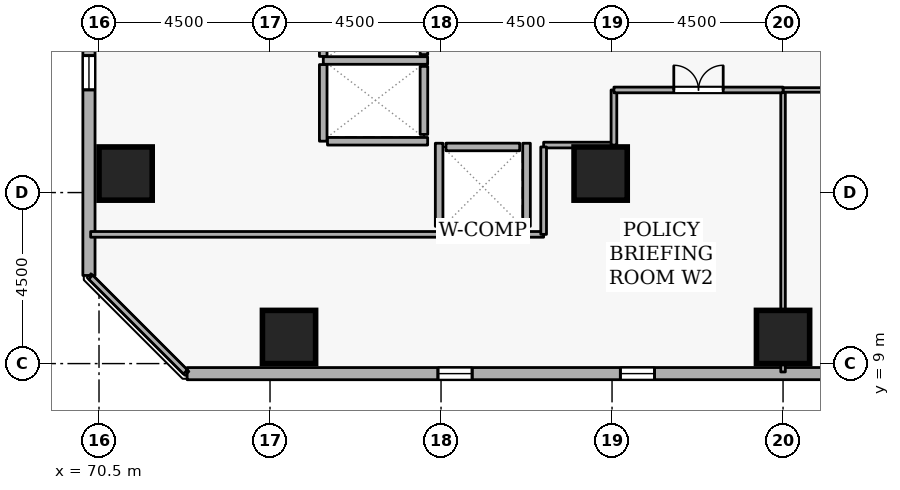
"""IFC4 building model, lengths in metres.
Left out: names, types, materials, properties, quantities, classifications, styles, units other than length and angle.
Written with IfcOpenShell. Run it as: python <this file> out.ifc"""

import sys

from ifc_helpers import new_model, si_unit, direction, frame, frame_2d, origin, origin_2d, place, context, subcontext, project, spatial, rectangle, extrude, element, fill, save


model = new_model("IFC4")
c1 = context("Model", 3, precision=1e-05, world=origin(), true_north=direction((0.0, 1.0)))
c2 = subcontext(c1, "Body", "Model", "MODEL_VIEW")
j1 = project(units=[si_unit("LENGTHUNIT", "METRE"), si_unit("PLANEANGLEUNIT", "RADIAN")], contexts=[c1])
p1 = place(None, origin())
s1 = spatial("IfcSite", under=j1, at=p1, CompositionType="ELEMENT")
p2 = place(p1, origin())
s2 = spatial("IfcBuilding", under=s1, at=p2, CompositionType="ELEMENT")
p3 = place(p2, frame((0.0, 0.0, 57.3)))
s3 = spatial("IfcBuildingStorey", under=s2, at=p3, CompositionType="ELEMENT", Elevation=57.3)
for number, where, z_axis, x_axis in (
    (1, (71.2, 14.0, 0.0), (0.0, 0.0, 1.0), (1.0, 0.0, 0.0)),
    (2, (88.5, 9.7, 0.0), (0.0, 0.0, 1.0), (1.0, 0.0, 0.0)),
    (3, (75.5, 9.7, 0.0), (0.0, 0.0, 1.0), (1.0, 0.0, 0.0)),
    (4, (83.7, 14.0, 0.0), (0.0, 0.0, 1.0), (1.0, 0.0, 0.0)),
):
    element("IfcColumn", number, at=place(p3, frame(where, z_axis=z_axis, x_axis=x_axis)), inside=s3, PredefinedType="COLUMN", context=c2, shape_type="SweptSolid", body=[
        extrude(rectangle(XDim=1.4, YDim=1.4, at=origin_2d()), origin(), (0.0, 0.0, 1.0), 3.6),
    ])
p4 = place(p3, frame((72.819, 8.735, 0.0), z_axis=(0.0, 0.0, 1.0), x_axis=(0.999999996195, 8.7231344e-05, 0.0)))
e5 = element("IfcWall", 5, at=p4, inside=s3, PredefinedType="STANDARD", context=c2, shape_type="SweptSolid", body=[
    extrude(rectangle(XDim=36.384, YDim=0.32, at=frame_2d((18.192, 0.0))), origin(), (0.0, 0.0, 1.0), 2.7),
])
p5 = place(p4, frame((6.6, 0.0, 0.72)))
e6 = element("IfcOpeningElement", 6, at=p5, cuts=e5, PredefinedType="OPENING", context=c2, shape_type="SweptSolid", body=[
    extrude(rectangle(XDim=0.9, YDim=1.75, at=frame_2d((0.45, 0.875))), frame((0.0, 0.17, 0.0), z_axis=(0.0, -1.0, 0.0), x_axis=(1.0, 0.0, 0.0)), (0.0, 0.0, 1.0), 0.34),
])
p6 = place(p4, frame((11.4, 0.0, 0.72)))
e7 = element("IfcOpeningElement", 7, at=p6, cuts=e5, PredefinedType="OPENING", context=c2, shape_type="SweptSolid", body=[
    extrude(rectangle(XDim=0.9, YDim=1.75, at=frame_2d((0.45, 0.875))), frame((0.0, 0.17, 0.0), z_axis=(0.0, -1.0, 0.0), x_axis=(1.0, 0.0, 0.0)), (0.0, 0.0, 1.0), 0.34),
])
p7 = place(p4, frame((21.0, 0.0, 0.72)))
e8 = element("IfcOpeningElement", 8, at=p7, cuts=e5, PredefinedType="OPENING", context=c2, shape_type="SweptSolid", body=[
    extrude(rectangle(XDim=0.9, YDim=1.75, at=frame_2d((0.45, 0.875))), frame((0.0, 0.17, 0.0), z_axis=(0.0, -1.0, 0.0), x_axis=(1.0, 0.0, 0.0)), (0.0, 0.0, 1.0), 0.34),
])
p8 = place(p4, frame((25.8, 0.0, 0.72)))
e9 = element("IfcOpeningElement", 9, at=p8, cuts=e5, PredefinedType="OPENING", context=c2, shape_type="SweptSolid", body=[
    extrude(rectangle(XDim=0.9, YDim=1.75, at=frame_2d((0.45, 0.875))), frame((0.0, 0.17, 0.0), z_axis=(0.0, -1.0, 0.0), x_axis=(1.0, 0.0, 0.0)), (0.0, 0.0, 1.0), 0.34),
])
p9 = place(p3, frame((70.238, 47.703, 0.0), z_axis=(0.0, 0.0, 1.0), x_axis=(-8.7231344e-05, -0.999999996195, 0.0)))
e10 = element("IfcWall", 10, at=p9, inside=s3, PredefinedType="STANDARD", context=c2, shape_type="SweptSolid", body=[
    extrude(rectangle(XDim=36.384, YDim=0.32, at=frame_2d((18.192, 0.0))), origin(), (0.0, 0.0, 1.0), 2.7),
])
p10 = place(p9, frame((1.8, 0.0, 0.72)))
e11 = element("IfcOpeningElement", 11, at=p10, cuts=e10, PredefinedType="OPENING", context=c2, shape_type="SweptSolid", body=[
    extrude(rectangle(XDim=0.9, YDim=1.75, at=frame_2d((0.45, 0.875))), frame((0.0, 0.17, 0.0), z_axis=(0.0, -1.0, 0.0), x_axis=(1.0, 0.0, 0.0)), (0.0, 0.0, 1.0), 0.34),
])
p11 = place(p9, frame((11.4, 0.0, 0.72)))
e12 = element("IfcOpeningElement", 12, at=p11, cuts=e10, PredefinedType="OPENING", context=c2, shape_type="SweptSolid", body=[
    extrude(rectangle(XDim=0.9, YDim=1.75, at=frame_2d((0.45, 0.875))), frame((0.0, 0.17, 0.0), z_axis=(0.0, -1.0, 0.0), x_axis=(1.0, 0.0, 0.0)), (0.0, 0.0, 1.0), 0.34),
])
p12 = place(p9, frame((16.2, 0.0, 0.72)))
e13 = element("IfcOpeningElement", 13, at=p12, cuts=e10, PredefinedType="OPENING", context=c2, shape_type="SweptSolid", body=[
    extrude(rectangle(XDim=0.9, YDim=1.75, at=frame_2d((0.45, 0.875))), frame((0.0, 0.17, 0.0), z_axis=(0.0, -1.0, 0.0), x_axis=(1.0, 0.0, 0.0)), (0.0, 0.0, 1.0), 0.34),
])
p13 = place(p9, frame((25.8, 0.0, 0.72)))
e14 = element("IfcOpeningElement", 14, at=p13, cuts=e10, PredefinedType="OPENING", context=c2, shape_type="SweptSolid", body=[
    extrude(rectangle(XDim=0.9, YDim=1.75, at=frame_2d((0.45, 0.875))), frame((0.0, 0.17, 0.0), z_axis=(0.0, -1.0, 0.0), x_axis=(1.0, 0.0, 0.0)), (0.0, 0.0, 1.0), 0.34),
])
p14 = place(p9, frame((30.6, 0.0, 0.72)))
e15 = element("IfcOpeningElement", 15, at=p14, cuts=e10, PredefinedType="OPENING", context=c2, shape_type="SweptSolid", body=[
    extrude(rectangle(XDim=0.9, YDim=1.75, at=frame_2d((0.45, 0.875))), frame((0.0, 0.17, 0.0), z_axis=(0.0, -1.0, 0.0), x_axis=(1.0, 0.0, 0.0)), (0.0, 0.0, 1.0), 0.34),
])
p15 = place(p3, frame((79.05, 17.13, 0.0), z_axis=(0.0, 0.0, 1.0), x_axis=(0.0, 1.0, 0.0)))
e16 = element("IfcWall", 16, at=p15, inside=s3, PredefinedType="STANDARD", context=c2, shape_type="SweptSolid", body=[
    extrude(rectangle(XDim=1.74, YDim=0.2, at=frame_2d((0.87, 0.0))), origin(), (0.0, 0.0, 1.0), 3.34),
])
p16 = place(p3, frame((79.05, 15.03, 0.0), z_axis=(0.0, 0.0, 1.0), x_axis=(0.0, 1.0, 0.0)))
e17 = element("IfcWall", 17, at=p16, inside=s3, PredefinedType="STANDARD", context=c2, shape_type="SweptSolid", body=[
    extrude(rectangle(XDim=1.79, YDim=0.2, at=frame_2d((0.895, 0.0))), origin(), (0.0, 0.0, 1.0), 3.34),
])
p17 = place(p3, frame((79.63, 14.7, 0.0), z_axis=(0.0, 0.0, 1.0), x_axis=(1.0, 0.0, 0.0)))
e18 = element("IfcWall", 18, at=p17, inside=s3, PredefinedType="STANDARD", context=c2, shape_type="SweptSolid", body=[
    extrude(rectangle(XDim=1.94, YDim=0.2, at=frame_2d((0.97, 0.0))), origin(), (0.0, 0.0, 1.0), 3.34),
])
p18 = place(p3, frame((76.402, 16.975, 0.0), z_axis=(0.0, 0.0, 1.0), x_axis=(1.0, 0.0, 0.0)))
e19 = element("IfcWall", 19, at=p18, inside=s3, PredefinedType="STANDARD", context=c2, shape_type="SweptSolid", body=[
    extrude(rectangle(XDim=2.746, YDim=0.2, at=frame_2d((1.373, 0.0))), origin(), (0.0, 0.0, 1.0), 3.34),
])
p19 = place(p3, frame((76.4, 14.852, 0.0), z_axis=(0.0, 0.0, 1.0), x_axis=(0.0, 1.0, 0.0)))
e20 = element("IfcWall", 20, at=p19, inside=s3, PredefinedType="STANDARD", context=c2, shape_type="SweptSolid", body=[
    extrude(rectangle(XDim=2.016, YDim=0.2, at=frame_2d((1.008, 0.0))), origin(), (0.0, 0.0, 1.0), 3.34),
])
p20 = place(p3, frame((76.4, 17.082, 0.0), z_axis=(0.0, 0.0, 1.0), x_axis=(0.0, 1.0, 0.0)))
e21 = element("IfcWall", 21, at=p20, inside=s3, PredefinedType="STANDARD", context=c2, shape_type="SweptSolid", body=[
    extrude(rectangle(XDim=1.856, YDim=0.2, at=frame_2d((0.928, 0.0))), origin(), (0.0, 0.0, 1.0), 3.34),
])
p21 = place(p3, frame((76.512, 14.85, 0.0), z_axis=(0.0, 0.0, 1.0), x_axis=(1.0, 0.0, 0.0)))
e22 = element("IfcWall", 22, at=p21, inside=s3, PredefinedType="STANDARD", context=c2, shape_type="SweptSolid", body=[
    extrude(rectangle(XDim=2.636, YDim=0.2, at=frame_2d((1.318, 0.0))), origin(), (0.0, 0.0, 1.0), 3.34),
])
p22 = place(p3, frame((79.452, 12.5, 0.0), z_axis=(0.0, 0.0, 1.0), x_axis=(1.0, 0.0, 0.0)))
e23 = element("IfcWall", 23, at=p22, inside=s3, PredefinedType="STANDARD", context=c2, shape_type="SweptSolid", body=[
    extrude(rectangle(XDim=2.296, YDim=0.2, at=frame_2d((1.148, 0.0))), origin(), (0.0, 0.0, 1.0), 3.34),
])
for number, where, z_axis, x_axis in (
    (24, (81.75, 12.612, 0.0), (0.0, 0.0, 1.0), (0.0, 1.0, 0.0)),
    (25, (79.45, 12.612, 0.0), (0.0, 0.0, 1.0), (0.0, 1.0, 0.0)),
):
    element("IfcWall", number, at=place(p3, frame(where, z_axis=z_axis, x_axis=x_axis)), inside=s3, PredefinedType="STANDARD", context=c2, shape_type="SweptSolid", body=[
        extrude(rectangle(XDim=2.186, YDim=0.2, at=frame_2d((1.093, 0.0))), origin(), (0.0, 0.0, 1.0), 3.34),
    ])
p23 = place(p3, frame((88.5, 8.78, 0.0), z_axis=(0.0, 0.0, 1.0), x_axis=(0.0, 1.0, 0.0)))
e26 = element("IfcWall", 26, at=p23, inside=s3, PredefinedType="PARTITIONING", context=c2, shape_type="SweptSolid", body=[
    extrude(rectangle(XDim=7.42, YDim=0.12, at=frame_2d((3.71, 0.0))), origin(), (0.0, 0.0, 1.0), 2.932),
])
p24 = place(p3, frame((88.5, 16.2, 0.0), z_axis=(0.0, 0.0, 1.0), x_axis=(1.0, 0.0, 0.0)))
e27 = element("IfcWall", 27, at=p24, inside=s3, PredefinedType="PARTITIONING", context=c2, shape_type="SweptSolid", body=[
    extrude(rectangle(XDim=4.45, YDim=0.12, at=frame_2d((2.225, 0.0))), origin(), (0.0, 0.0, 1.0), 3.34),
])
p25 = place(p3, frame((82.2, 14.75, 0.0), z_axis=(0.0, 0.0, 1.0), x_axis=(1.0, 0.0, 0.0)))
e28 = element("IfcWall", 28, at=p25, inside=s3, PredefinedType="PARTITIONING", context=c2, shape_type="SweptSolid", body=[
    extrude(rectangle(XDim=1.85, YDim=0.15, at=frame_2d((0.925, 0.0))), origin(), (0.0, 0.0, 1.0), 3.34),
])
p26 = place(p3, frame((84.05, 14.75, 0.0), z_axis=(0.0, 0.0, 1.0), x_axis=(0.0, 1.0, 0.0)))
e29 = element("IfcWall", 29, at=p26, inside=s3, PredefinedType="PARTITIONING", context=c2, shape_type="SweptSolid", body=[
    extrude(rectangle(XDim=1.45, YDim=0.15, at=frame_2d((0.725, 0.0))), origin(), (0.0, 0.0, 1.0), 3.34),
])
p27 = place(p3, frame((84.05, 16.2, 0.0), z_axis=(0.0, 0.0, 1.0), x_axis=(1.0, 0.0, 0.0)))
e30 = element("IfcWall", 30, at=p27, inside=s3, PredefinedType="PARTITIONING", context=c2, shape_type="SweptSolid", body=[
    extrude(rectangle(XDim=4.45, YDim=0.15, at=frame_2d((2.225, 0.0))), origin(), (0.0, 0.0, 1.0), 3.34),
])
p28 = place(p27, frame((1.575, 0.0, 0.0)))
e31 = element("IfcOpeningElement", 31, at=p28, cuts=e30, PredefinedType="OPENING", context=c2, shape_type="SweptSolid", body=[
    extrude(rectangle(XDim=1.3, YDim=2.12, at=frame_2d((0.65, 1.06))), frame((0.0, 0.085, 0.0), z_axis=(0.0, -1.0, 0.0), x_axis=(1.0, 0.0, 0.0)), (0.0, 0.0, 1.0), 0.17),
])
p29 = place(p3, frame((72.775, 8.78, 0.0), z_axis=(0.0, 0.0, 1.0), x_axis=(-0.707106781187, 0.707106781187, 0.0)))
e32 = element("IfcWall", 32, at=p29, inside=s3, PredefinedType="PARTITIONING", context=c2, shape_type="SweptSolid", body=[
    extrude(rectangle(XDim=3.528, YDim=0.15, at=frame_2d((1.764, 0.0))), origin(), (0.0, 0.0, 1.0), 3.34),
])
p30 = place(p3, frame((70.28, 12.4, 0.0), z_axis=(0.0, 0.0, 1.0), x_axis=(1.0, 0.0, 0.0)))
e33 = element("IfcWall", 33, at=p30, inside=s3, PredefinedType="PARTITIONING", context=c2, shape_type="SweptSolid", body=[
    extrude(rectangle(XDim=9.172, YDim=0.15, at=frame_2d((4.586, 0.0))), origin(), (0.0, 0.0, 1.0), 3.34),
])
p31 = place(p3, frame((81.748, 12.4, 0.0), z_axis=(0.0, 0.0, 1.0), x_axis=(1.0, 0.0, 0.0)))
e34 = element("IfcWall", 34, at=p31, inside=s3, PredefinedType="PARTITIONING", context=c2, shape_type="SweptSolid", body=[
    extrude(rectangle(XDim=0.452, YDim=0.15, at=frame_2d((0.226, 0.0))), origin(), (0.0, 0.0, 1.0), 3.34),
])
p32 = place(p3, frame((82.2, 12.4, 0.0), z_axis=(0.0, 0.0, 1.0), x_axis=(0.0, 1.0, 0.0)))
e35 = element("IfcWall", 35, at=p32, inside=s3, PredefinedType="PARTITIONING", context=c2, shape_type="SweptSolid", body=[
    extrude(rectangle(XDim=2.3, YDim=0.15, at=frame_2d((1.15, 0.0))), origin(), (0.0, 0.0, 1.0), 3.34),
])
p33 = place(p5, origin())
e36 = element("IfcWindow", 36, at=p33, inside=s3, PartitioningType="SINGLE_PANEL", PredefinedType="WINDOW", context=c2, shape_type="SweptSolid", body=[
    extrude(rectangle(XDim=0.9, YDim=1.75, at=frame_2d((0.45, 0.875))), frame((0.0, 0.03, 0.0), z_axis=(0.0, -1.0, 0.0), x_axis=(1.0, 0.0, 0.0)), (0.0, 0.0, 1.0), 0.06),
])
fill(e6, e36)
p34 = place(p6, origin())
e37 = element("IfcWindow", 37, at=p34, inside=s3, PartitioningType="SINGLE_PANEL", PredefinedType="WINDOW", context=c2, shape_type="SweptSolid", body=[
    extrude(rectangle(XDim=0.9, YDim=1.75, at=frame_2d((0.45, 0.875))), frame((0.0, 0.03, 0.0), z_axis=(0.0, -1.0, 0.0), x_axis=(1.0, 0.0, 0.0)), (0.0, 0.0, 1.0), 0.06),
])
fill(e7, e37)
p35 = place(p14, origin())
e38 = element("IfcWindow", 38, at=p35, inside=s3, PartitioningType="SINGLE_PANEL", PredefinedType="WINDOW", context=c2, shape_type="SweptSolid", body=[
    extrude(rectangle(XDim=0.9, YDim=1.75, at=frame_2d((0.45, 0.875))), frame((0.0, 0.03, 0.0), z_axis=(0.0, -1.0, 0.0), x_axis=(1.0, 0.0, 0.0)), (0.0, 0.0, 1.0), 0.06),
])
fill(e15, e38)
p36 = place(p28, origin())
e39 = element("IfcDoor", 39, at=p36, inside=s3, OperationType="DOUBLE_DOOR_SINGLE_SWING", PredefinedType="DOOR", context=c2, shape_type="SweptSolid", body=[
    extrude(rectangle(XDim=1.3, YDim=2.12, at=frame_2d((0.65, 1.06))), frame((0.0, 0.025, 0.0), z_axis=(0.0, -1.0, 0.0), x_axis=(1.0, 0.0, 0.0)), (0.0, 0.0, 1.0), 0.05),
])
fill(e31, e39)
save(model, sys.argv[1])
